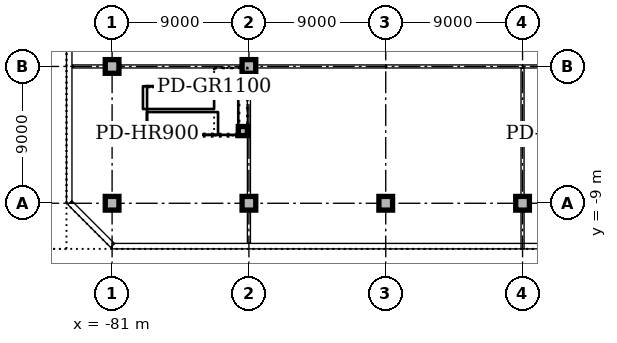
"""IFC4 building model, lengths in metres.
Left out: names, types, materials, properties, quantities, classifications, styles, units other than length and angle.
Written with IfcOpenShell. Run it as: python <this file> out.ifc"""

import sys

from ifc_helpers import new_model, si_unit, direction, frame, frame_2d, origin, origin_2d, place, context, subcontext, project, spatial, rectangle, extrude, element, fill, save


model = new_model("IFC4")
c1 = context("Model", 3, precision=1e-05, world=origin(), true_north=direction((0.0, 1.0)))
c2 = subcontext(c1, "Body", "Model", "MODEL_VIEW")
j1 = project(units=[si_unit("LENGTHUNIT", "METRE"), si_unit("PLANEANGLEUNIT", "RADIAN")], contexts=[c1])
p1 = place(None, origin())
s1 = spatial("IfcSite", under=j1, at=p1, CompositionType="ELEMENT")
p2 = place(p1, origin())
s2 = spatial("IfcBuilding", under=s1, at=p2, CompositionType="ELEMENT")
p3 = place(p2, origin())
s3 = spatial("IfcBuildingStorey", under=s2, at=p3, CompositionType="ELEMENT", Elevation=0.0)
for number, where, z_axis, x_axis in (
    (1, (-81.0, -9.0, 0.0), (0.0, 0.0, 1.0), (1.0, 0.0, 0.0)),
    (2, (-81.0, 0.0, 0.0), (0.0, 0.0, 1.0), (1.0, 0.0, 0.0)),
    (3, (-72.0, -9.0, 0.0), (0.0, 0.0, 1.0), (1.0, 0.0, 0.0)),
    (4, (-72.0, 0.0, 0.0), (0.0, 0.0, 1.0), (1.0, 0.0, 0.0)),
    (5, (-63.0, -9.0, 0.0), (0.0, 0.0, 1.0), (1.0, 0.0, 0.0)),
    (6, (-54.0, -9.0, 0.0), (0.0, 0.0, 1.0), (1.0, 0.0, 0.0)),
):
    element("IfcColumn", number, at=place(p3, frame(where, z_axis=z_axis, x_axis=x_axis)), inside=s3, PredefinedType="COLUMN", context=c2, shape_type="SweptSolid", body=[
        extrude(rectangle(XDim=0.9, YDim=0.9, at=origin_2d()), origin(), (0.0, 0.0, 1.0), 5.7),
    ])
p4 = place(p3, frame((-81.0, -11.82, 0.0), z_axis=(0.0, 0.0, 1.0), x_axis=(1.0, 0.0, 0.0)))
e7 = element("IfcWall", 7, at=p4, inside=s3, PredefinedType="STANDARD", context=c2, shape_type="SweptSolid", body=[
    extrude(rectangle(XDim=54.0, YDim=0.36, at=frame_2d((27.0, 0.0))), origin(), (0.0, 0.0, 1.0), 5.7),
])
p5 = place(p4, frame((22.8, 0.0, 0.0)))
e8 = element("IfcOpeningElement", 8, at=p5, cuts=e7, PredefinedType="OPENING", context=c2, shape_type="SweptSolid", body=[
    extrude(rectangle(XDim=2.4, YDim=2.4, at=frame_2d((1.2, 1.2))), frame((0.0, 0.19, 0.0), z_axis=(0.0, -1.0, 0.0), x_axis=(1.0, 0.0, 0.0)), (0.0, 0.0, 1.0), 0.38),
])
p6 = place(p4, frame((13.8, 0.0, 0.0)))
e9 = element("IfcOpeningElement", 9, at=p6, cuts=e7, PredefinedType="OPENING", context=c2, shape_type="SweptSolid", body=[
    extrude(rectangle(XDim=2.4, YDim=2.2, at=frame_2d((1.2, 1.1))), frame((0.0, 0.19, 0.0), z_axis=(0.0, -1.0, 0.0), x_axis=(1.0, 0.0, 0.0)), (0.0, 0.0, 1.0), 0.38),
])
p7 = place(p4, frame((39.3, 0.0, 0.0)))
e10 = element("IfcOpeningElement", 10, at=p7, cuts=e7, PredefinedType="OPENING", context=c2, shape_type="SweptSolid", body=[
    extrude(rectangle(XDim=2.4, YDim=2.2, at=frame_2d((1.2, 1.1))), frame((0.0, 0.19, 0.0), z_axis=(0.0, -1.0, 0.0), x_axis=(1.0, 0.0, 0.0)), (0.0, 0.0, 1.0), 0.38),
])
p8 = place(p4, frame((2.1, 0.0, 0.0)))
e11 = element("IfcOpeningElement", 11, at=p8, cuts=e7, PredefinedType="OPENING", context=c2, shape_type="SweptSolid", body=[
    extrude(rectangle(XDim=1.8, YDim=2.2, at=frame_2d((0.9, 1.1))), frame((0.0, 0.19, 0.0), z_axis=(0.0, -1.0, 0.0), x_axis=(1.0, 0.0, 0.0)), (0.0, 0.0, 1.0), 0.38),
])
p9 = place(p4, frame((30.6, 0.0, 0.0)))
e12 = element("IfcOpeningElement", 12, at=p9, cuts=e7, PredefinedType="OPENING", context=c2, shape_type="SweptSolid", body=[
    extrude(rectangle(XDim=1.8, YDim=2.2, at=frame_2d((0.9, 1.1))), frame((0.0, 0.19, 0.0), z_axis=(0.0, -1.0, 0.0), x_axis=(1.0, 0.0, 0.0)), (0.0, 0.0, 1.0), 0.38),
])
p10 = place(p4, frame((48.6, 0.0, 0.0)))
e13 = element("IfcOpeningElement", 13, at=p10, cuts=e7, PredefinedType="OPENING", context=c2, shape_type="SweptSolid", body=[
    extrude(rectangle(XDim=1.8, YDim=2.2, at=frame_2d((0.9, 1.1))), frame((0.0, 0.19, 0.0), z_axis=(0.0, -1.0, 0.0), x_axis=(1.0, 0.0, 0.0)), (0.0, 0.0, 1.0), 0.38),
])
p11 = place(p4, frame((7.35, 0.0, 0.6)))
e14 = element("IfcOpeningElement", 14, at=p11, cuts=e7, PredefinedType="OPENING", context=c2, shape_type="SweptSolid", body=[
    extrude(rectangle(XDim=3.3, YDim=3.0, at=frame_2d((1.65, 1.5))), frame((0.0, 0.19, 0.0), z_axis=(0.0, -1.0, 0.0), x_axis=(1.0, 0.0, 0.0)), (0.0, 0.0, 1.0), 0.38),
])
p12 = place(p4, frame((34.35, 0.0, 0.6)))
e15 = element("IfcOpeningElement", 15, at=p12, cuts=e7, PredefinedType="OPENING", context=c2, shape_type="SweptSolid", body=[
    extrude(rectangle(XDim=3.3, YDim=3.0, at=frame_2d((1.65, 1.5))), frame((0.0, 0.19, 0.0), z_axis=(0.0, -1.0, 0.0), x_axis=(1.0, 0.0, 0.0)), (0.0, 0.0, 1.0), 0.38),
])
p13 = place(p4, frame((43.35, 0.0, 0.6)))
e16 = element("IfcOpeningElement", 16, at=p13, cuts=e7, PredefinedType="OPENING", context=c2, shape_type="SweptSolid", body=[
    extrude(rectangle(XDim=3.3, YDim=3.0, at=frame_2d((1.65, 1.5))), frame((0.0, 0.19, 0.0), z_axis=(0.0, -1.0, 0.0), x_axis=(1.0, 0.0, 0.0)), (0.0, 0.0, 1.0), 0.38),
])
p14 = place(p3, frame((-83.82, 54.0, 0.0), z_axis=(0.0, 0.0, 1.0), x_axis=(0.0, -1.0, 0.0)))
e17 = element("IfcWall", 17, at=p14, inside=s3, PredefinedType="STANDARD", context=c2, shape_type="SweptSolid", body=[
    extrude(rectangle(XDim=63.0, YDim=0.36, at=frame_2d((31.5, 0.0))), origin(), (0.0, 0.0, 1.0), 5.7),
])
p15 = place(p14, frame((41.4, 0.0, 0.0)))
e18 = element("IfcOpeningElement", 18, at=p15, cuts=e17, PredefinedType="OPENING", context=c2, shape_type="SweptSolid", body=[
    extrude(rectangle(XDim=1.2, YDim=2.2, at=frame_2d((0.6, 1.1))), frame((0.0, 0.19, 0.0), z_axis=(0.0, -1.0, 0.0), x_axis=(1.0, 0.0, 0.0)), (0.0, 0.0, 1.0), 0.38),
])
p16 = place(p14, frame((30.3, 0.0, 0.0)))
e19 = element("IfcOpeningElement", 19, at=p16, cuts=e17, PredefinedType="OPENING", context=c2, shape_type="SweptSolid", body=[
    extrude(rectangle(XDim=2.4, YDim=2.2, at=frame_2d((1.2, 1.1))), frame((0.0, 0.19, 0.0), z_axis=(0.0, -1.0, 0.0), x_axis=(1.0, 0.0, 0.0)), (0.0, 0.0, 1.0), 0.38),
])
p17 = place(p14, frame((11.85, 0.0, 0.6)))
e20 = element("IfcOpeningElement", 20, at=p17, cuts=e17, PredefinedType="OPENING", context=c2, shape_type="SweptSolid", body=[
    extrude(rectangle(XDim=3.3, YDim=3.0, at=frame_2d((1.65, 1.5))), frame((0.0, 0.19, 0.0), z_axis=(0.0, -1.0, 0.0), x_axis=(1.0, 0.0, 0.0)), (0.0, 0.0, 1.0), 0.38),
])
p18 = place(p14, frame((16.35, 0.0, 0.6)))
e21 = element("IfcOpeningElement", 21, at=p18, cuts=e17, PredefinedType="OPENING", context=c2, shape_type="SweptSolid", body=[
    extrude(rectangle(XDim=3.3, YDim=3.0, at=frame_2d((1.65, 1.5))), frame((0.0, 0.19, 0.0), z_axis=(0.0, -1.0, 0.0), x_axis=(1.0, 0.0, 0.0)), (0.0, 0.0, 1.0), 0.38),
])
p19 = place(p14, frame((20.85, 0.0, 0.6)))
e22 = element("IfcOpeningElement", 22, at=p19, cuts=e17, PredefinedType="OPENING", context=c2, shape_type="SweptSolid", body=[
    extrude(rectangle(XDim=3.3, YDim=3.0, at=frame_2d((1.65, 1.5))), frame((0.0, 0.19, 0.0), z_axis=(0.0, -1.0, 0.0), x_axis=(1.0, 0.0, 0.0)), (0.0, 0.0, 1.0), 0.38),
])
p20 = place(p14, frame((25.35, 0.0, 0.6)))
e23 = element("IfcOpeningElement", 23, at=p20, cuts=e17, PredefinedType="OPENING", context=c2, shape_type="SweptSolid", body=[
    extrude(rectangle(XDim=3.3, YDim=3.0, at=frame_2d((1.65, 1.5))), frame((0.0, 0.19, 0.0), z_axis=(0.0, -1.0, 0.0), x_axis=(1.0, 0.0, 0.0)), (0.0, 0.0, 1.0), 0.38),
])
p21 = place(p14, frame((34.35, 0.0, 0.6)))
e24 = element("IfcOpeningElement", 24, at=p21, cuts=e17, PredefinedType="OPENING", context=c2, shape_type="SweptSolid", body=[
    extrude(rectangle(XDim=3.3, YDim=3.0, at=frame_2d((1.65, 1.5))), frame((0.0, 0.19, 0.0), z_axis=(0.0, -1.0, 0.0), x_axis=(1.0, 0.0, 0.0)), (0.0, 0.0, 1.0), 0.38),
])
p22 = place(p14, frame((43.35, 0.0, 0.6)))
e25 = element("IfcOpeningElement", 25, at=p22, cuts=e17, PredefinedType="OPENING", context=c2, shape_type="SweptSolid", body=[
    extrude(rectangle(XDim=3.3, YDim=3.0, at=frame_2d((1.65, 1.5))), frame((0.0, 0.19, 0.0), z_axis=(0.0, -1.0, 0.0), x_axis=(1.0, 0.0, 0.0)), (0.0, 0.0, 1.0), 0.38),
])
p23 = place(p14, frame((47.85, 0.0, 0.6)))
e26 = element("IfcOpeningElement", 26, at=p23, cuts=e17, PredefinedType="OPENING", context=c2, shape_type="SweptSolid", body=[
    extrude(rectangle(XDim=3.3, YDim=3.0, at=frame_2d((1.65, 1.5))), frame((0.0, 0.19, 0.0), z_axis=(0.0, -1.0, 0.0), x_axis=(1.0, 0.0, 0.0)), (0.0, 0.0, 1.0), 0.38),
])
p24 = place(p14, frame((52.35, 0.0, 0.6)))
e27 = element("IfcOpeningElement", 27, at=p24, cuts=e17, PredefinedType="OPENING", context=c2, shape_type="SweptSolid", body=[
    extrude(rectangle(XDim=3.3, YDim=3.0, at=frame_2d((1.65, 1.5))), frame((0.0, 0.19, 0.0), z_axis=(0.0, -1.0, 0.0), x_axis=(1.0, 0.0, 0.0)), (0.0, 0.0, 1.0), 0.38),
])
p25 = place(p14, frame((56.85, 0.0, 0.6)))
e28 = element("IfcOpeningElement", 28, at=p25, cuts=e17, PredefinedType="OPENING", context=c2, shape_type="SweptSolid", body=[
    extrude(rectangle(XDim=3.3, YDim=3.0, at=frame_2d((1.65, 1.5))), frame((0.0, 0.19, 0.0), z_axis=(0.0, -1.0, 0.0), x_axis=(1.0, 0.0, 0.0)), (0.0, 0.0, 1.0), 0.38),
])
p26 = place(p3, frame((-83.784, -8.961, 0.0), z_axis=(0.0, 0.0, 1.0), x_axis=(0.707106781187, -0.707106781187, 0.0)))
e29 = element("IfcWall", 29, at=p26, inside=s3, PredefinedType="STANDARD", context=c2, shape_type="SweptSolid", body=[
    extrude(rectangle(XDim=3.993, YDim=0.36, at=frame_2d((1.996, 0.0))), origin(), (0.0, 0.0, 1.0), 5.7),
])
p27 = place(p3, frame((-72.4, -4.25, 0.0), z_axis=(0.0, 0.0, 1.0), x_axis=(1.0, 0.0, 0.0)))
e30 = element("IfcColumn", 30, at=p27, inside=s3, PredefinedType="COLUMN", context=c2, shape_type="SweptSolid", body=[
    extrude(rectangle(XDim=0.6, YDim=0.6, at=origin_2d()), origin(), (0.0, 0.0, 1.0), 6.0),
])
p28 = place(p3, frame((-83.6, 0.0, 0.0), z_axis=(0.0, 0.0, 1.0), x_axis=(1.0, 0.0, 0.0)))
e31 = element("IfcWall", 31, at=p28, inside=s3, PredefinedType="SOLIDWALL", context=c2, shape_type="SweptSolid", body=[
    extrude(rectangle(XDim=2.13, YDim=0.2, at=frame_2d((1.065, 0.0))), origin(), (0.0, 0.0, 1.0), 5.7),
])
p29 = place(p3, frame((-80.53, 0.0, 0.0), z_axis=(0.0, 0.0, 1.0), x_axis=(1.0, 0.0, 0.0)))
e32 = element("IfcWall", 32, at=p29, inside=s3, PredefinedType="SOLIDWALL", context=c2, shape_type="SweptSolid", body=[
    extrude(rectangle(XDim=8.06, YDim=0.2, at=frame_2d((4.03, 0.0))), origin(), (0.0, 0.0, 1.0), 5.7),
])
p30 = place(p3, frame((-72.0, -11.6, 0.0), z_axis=(0.0, 0.0, 1.0), x_axis=(0.0, 1.0, 0.0)))
e33 = element("IfcWall", 33, at=p30, inside=s3, PredefinedType="SOLIDWALL", context=c2, shape_type="SweptSolid", body=[
    extrude(rectangle(XDim=2.13, YDim=0.2, at=frame_2d((1.065, 0.0))), origin(), (0.0, 0.0, 1.0), 5.7),
])
p31 = place(p3, frame((-72.0, -8.53, 0.0), z_axis=(0.0, 0.0, 1.0), x_axis=(0.0, 1.0, 0.0)))
e34 = element("IfcWall", 34, at=p31, inside=s3, PredefinedType="SOLIDWALL", context=c2, shape_type="SweptSolid", body=[
    extrude(rectangle(XDim=8.06, YDim=0.2, at=frame_2d((4.03, 0.0))), origin(), (0.0, 0.0, 1.0), 5.7),
])
p32 = place(p3, frame((-54.0, 0.0, 0.0), z_axis=(0.0, 0.0, 1.0), x_axis=(1.0, 0.0, 0.0)))
e35 = element("IfcWall", 35, at=p32, inside=s3, PredefinedType="SOLIDWALL", context=c2, shape_type="SweptSolid", body=[
    extrude(rectangle(XDim=9.0, YDim=0.2, at=frame_2d((4.5, 0.0))), origin(), (0.0, 0.0, 1.0), 5.7),
])
p33 = place(p3, frame((-54.0, -12.0, 0.0), z_axis=(0.0, 0.0, 1.0), x_axis=(0.0, 1.0, 0.0)))
e36 = element("IfcWall", 36, at=p33, inside=s3, PredefinedType="SOLIDWALL", context=c2, shape_type="SweptSolid", body=[
    extrude(rectangle(XDim=2.53, YDim=0.2, at=frame_2d((1.265, 0.0))), origin(), (0.0, 0.0, 1.0), 5.7),
])
p34 = place(p3, frame((-54.0, -8.53, 0.0), z_axis=(0.0, 0.0, 1.0), x_axis=(0.0, 1.0, 0.0)))
e37 = element("IfcWall", 37, at=p34, inside=s3, PredefinedType="SOLIDWALL", context=c2, shape_type="SweptSolid", body=[
    extrude(rectangle(XDim=8.43, YDim=0.2, at=frame_2d((4.215, 0.0))), origin(), (0.0, 0.0, 1.0), 5.7),
])
p35 = place(p3, frame((-63.0, 0.0, 0.0), z_axis=(0.0, 0.0, 1.0), x_axis=(1.0, 0.0, 0.0)))
e38 = element("IfcWall", 38, at=p35, inside=s3, PredefinedType="PARTITIONING", context=c2, shape_type="SweptSolid", body=[
    extrude(rectangle(XDim=9.0, YDim=0.2, at=frame_2d((4.5, 0.0))), origin(), (0.0, 0.0, 1.0), 5.7),
])
p36 = place(p35, frame((7.7, 0.0, 0.0)))
e39 = element("IfcOpeningElement", 39, at=p36, cuts=e38, PredefinedType="OPENING", context=c2, shape_type="SweptSolid", body=[
    extrude(rectangle(XDim=1.0, YDim=2.1, at=frame_2d((0.5, 1.05))), frame((0.0, 0.11, 0.0), z_axis=(0.0, -1.0, 0.0), x_axis=(1.0, 0.0, 0.0)), (0.0, 0.0, 1.0), 0.22),
])
p37 = place(p3, frame((-71.53, 0.0, 0.0), z_axis=(0.0, 0.0, 1.0), x_axis=(1.0, 0.0, 0.0)))
e40 = element("IfcWall", 40, at=p37, inside=s3, PredefinedType="PARTITIONING", context=c2, shape_type="SweptSolid", body=[
    extrude(rectangle(XDim=8.53, YDim=0.2, at=frame_2d((4.265, 0.0))), origin(), (0.0, 0.0, 1.0), 5.7),
])
p38 = place(p5, frame((2.4, 0.0, 0.0), z_axis=(0.0, 0.0, 1.0), x_axis=(-1.0, 0.0, 0.0)))
e41 = element("IfcDoor", 41, at=p38, inside=s3, OperationType="DOUBLE_DOOR_SINGLE_SWING", PredefinedType="DOOR", context=c2, shape_type="SweptSolid", body=[
    extrude(rectangle(XDim=2.4, YDim=2.4, at=frame_2d((1.2, 1.2))), frame((0.0, -0.07, 0.0), z_axis=(0.0, -1.0, 0.0), x_axis=(1.0, 0.0, 0.0)), (0.0, 0.0, 1.0), 0.05),
])
fill(e8, e41)
p39 = place(p6, frame((2.4, 0.0, 0.0), z_axis=(0.0, 0.0, 1.0), x_axis=(-1.0, 0.0, 0.0)))
e42 = element("IfcDoor", 42, at=p39, inside=s3, OperationType="DOUBLE_DOOR_SINGLE_SWING", PredefinedType="DOOR", context=c2, shape_type="SweptSolid", body=[
    extrude(rectangle(XDim=2.4, YDim=2.2, at=frame_2d((1.2, 1.1))), frame((0.0, -0.07, 0.0), z_axis=(0.0, -1.0, 0.0), x_axis=(1.0, 0.0, 0.0)), (0.0, 0.0, 1.0), 0.05),
])
fill(e9, e42)
p40 = place(p8, frame((1.8, 0.0, 0.0), z_axis=(0.0, 0.0, 1.0), x_axis=(-1.0, 0.0, 0.0)))
e43 = element("IfcDoor", 43, at=p40, inside=s3, OperationType="DOUBLE_DOOR_SINGLE_SWING", PredefinedType="DOOR", context=c2, shape_type="SweptSolid", body=[
    extrude(rectangle(XDim=1.8, YDim=2.2, at=frame_2d((0.9, 1.1))), frame((0.0, -0.07, 0.0), z_axis=(0.0, -1.0, 0.0), x_axis=(1.0, 0.0, 0.0)), (0.0, 0.0, 1.0), 0.05),
])
fill(e11, e43)
p41 = place(p11, origin())
e44 = element("IfcWindow", 44, at=p41, inside=s3, PartitioningType="SINGLE_PANEL", PredefinedType="WINDOW", context=c2, shape_type="SweptSolid", body=[
    extrude(rectangle(XDim=3.3, YDim=3.0, at=frame_2d((1.65, 1.5))), frame((0.0, 0.13, 0.0), z_axis=(0.0, -1.0, 0.0), x_axis=(1.0, 0.0, 0.0)), (0.0, 0.0, 1.0), 0.06),
])
fill(e14, e44)
p42 = place(p24, origin())
e45 = element("IfcWindow", 45, at=p42, inside=s3, PartitioningType="SINGLE_PANEL", PredefinedType="WINDOW", context=c2, shape_type="SweptSolid", body=[
    extrude(rectangle(XDim=3.3, YDim=3.0, at=frame_2d((1.65, 1.5))), frame((0.0, 0.13, 0.0), z_axis=(0.0, -1.0, 0.0), x_axis=(1.0, 0.0, 0.0)), (0.0, 0.0, 1.0), 0.06),
])
fill(e27, e45)
p43 = place(p25, origin())
e46 = element("IfcWindow", 46, at=p43, inside=s3, PartitioningType="SINGLE_PANEL", PredefinedType="WINDOW", context=c2, shape_type="SweptSolid", body=[
    extrude(rectangle(XDim=3.3, YDim=3.0, at=frame_2d((1.65, 1.5))), frame((0.0, 0.13, 0.0), z_axis=(0.0, -1.0, 0.0), x_axis=(1.0, 0.0, 0.0)), (0.0, 0.0, 1.0), 0.06),
])
fill(e28, e46)
p44 = place(p36, frame((1.0, 0.0, 0.0), z_axis=(0.0, 0.0, 1.0), x_axis=(-1.0, 0.0, 0.0)))
e47 = element("IfcDoor", 47, at=p44, inside=s3, OperationType="SINGLE_SWING_LEFT", PredefinedType="DOOR", context=c2, shape_type="SweptSolid", body=[
    extrude(rectangle(XDim=1.0, YDim=2.1, at=frame_2d((0.5, 1.05))), frame((0.0, 0.025, 0.0), z_axis=(0.0, -1.0, 0.0), x_axis=(1.0, 0.0, 0.0)), (0.0, 0.0, 1.0), 0.05),
])
fill(e39, e47)
save(model, sys.argv[1])
